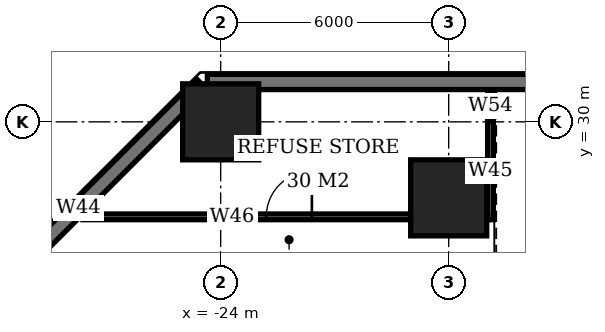
"""IFC4 building model, lengths in metres.
Left out: names, types, materials, properties, quantities, classifications, styles, units other than length and angle.
Written with IfcOpenShell. Run it as: python <this file> out.ifc"""

import sys

from ifc_helpers import new_model, si_unit, direction, frame, frame_2d, origin, origin_2d, place, context, subcontext, project, spatial, rectangle, extrude, element, fill, save


model = new_model("IFC4")
c1 = context("Model", 3, precision=1e-05, world=origin(), true_north=direction((0.0, 1.0)))
c2 = subcontext(c1, "Body", "Model", "MODEL_VIEW")
j1 = project(units=[si_unit("LENGTHUNIT", "METRE"), si_unit("PLANEANGLEUNIT", "RADIAN")], contexts=[c1])
p1 = place(None, origin())
s1 = spatial("IfcSite", under=j1, at=p1, CompositionType="ELEMENT")
p2 = place(p1, origin())
s2 = spatial("IfcBuilding", under=s1, at=p2, CompositionType="ELEMENT")
p3 = place(p2, frame((0.0, 0.0, -4.5)))
s3 = spatial("IfcBuildingStorey", under=s2, at=p3, CompositionType="ELEMENT", Elevation=-4.5)
p4 = place(p3, frame((-24.0, 30.0, 0.0), z_axis=(0.0, 0.0, 1.0), x_axis=(1.0, 0.0, 0.0)))
e1 = element("IfcColumn", 1, at=p4, inside=s3, PredefinedType="COLUMN", context=c2, shape_type="SweptSolid", body=[
    extrude(rectangle(XDim=2.0, YDim=2.0, at=origin_2d()), origin(), (0.0, 0.0, 1.0), 4.5),
])
p5 = place(p3, frame((-18.0, 28.0, 0.0), z_axis=(0.0, 0.0, 1.0), x_axis=(1.0, 0.0, 0.0)))
e2 = element("IfcColumn", 2, at=p5, inside=s3, PredefinedType="COLUMN", context=c2, shape_type="SweptSolid", body=[
    extrude(rectangle(XDim=2.0, YDim=2.0, at=origin_2d()), origin(), (0.0, 0.0, 1.0), 4.05),
])
p6 = place(p3, frame((-30.99, 24.495, 0.0), z_axis=(0.0, 0.0, 1.0), x_axis=(0.707106781187, 0.707106781187, 0.0)))
e3 = element("IfcWall", 3, at=p6, inside=s3, PredefinedType="USERDEFINED", context=c2, shape_type="SweptSolid", body=[
    extrude(rectangle(XDim=9.186, YDim=0.4, at=frame_2d((4.593, 0.0))), origin(), (0.0, 0.0, 1.0), 4.5),
])
p7 = place(p3, frame((-24.35, 31.05, 0.0), z_axis=(0.0, 0.0, 1.0), x_axis=(1.0, 0.0, 0.0)))
e4 = element("IfcWall", 4, at=p7, inside=s3, PredefinedType="USERDEFINED", context=c2, shape_type="SweptSolid", body=[
    extrude(rectangle(XDim=54.7, YDim=0.4, at=frame_2d((27.35, 0.0))), origin(), (0.0, 0.0, 1.0), 4.5),
])
p8 = place(p3, frame((-27.625, 27.5, 0.0), z_axis=(0.0, 0.0, 1.0), x_axis=(1.0, 0.0, 0.0)))
e5 = element("IfcWall", 5, at=p8, inside=s3, PredefinedType="PARTITIONING", context=c2, shape_type="SweptSolid", body=[
    extrude(rectangle(XDim=10.65, YDim=0.15, at=frame_2d((5.325, 0.0))), origin(), (0.0, 0.0, 1.0), 4.05),
])
p9 = place(p8, frame((4.825, 0.0, 0.0)))
e6 = element("IfcOpeningElement", 6, at=p9, cuts=e5, PredefinedType="OPENING", context=c2, shape_type="SweptSolid", body=[
    extrude(rectangle(XDim=1.2, YDim=2.4, at=frame_2d((0.6, 1.2))), frame((0.0, 0.085, 0.0), z_axis=(0.0, -1.0, 0.0), x_axis=(1.0, 0.0, 0.0)), (0.0, 0.0, 1.0), 0.17),
])
p10 = place(p3, frame((-16.9, 27.425, 0.0), z_axis=(0.0, 0.0, 1.0), x_axis=(0.0, 1.0, 0.0)))
e7 = element("IfcWall", 7, at=p10, inside=s3, PredefinedType="PARTITIONING", context=c2, shape_type="SweptSolid", body=[
    extrude(rectangle(XDim=2.585, YDim=0.15, at=frame_2d((1.292, 0.0))), origin(), (0.0, 0.0, 1.0), 2.55),
])
p11 = place(p3, frame((-16.9, 30.01, 0.0), z_axis=(0.0, 0.0, 1.0), x_axis=(0.0, 1.0, 0.0)))
e8 = element("IfcWall", 8, at=p11, inside=s3, PredefinedType="PARTITIONING", context=c2, shape_type="SweptSolid", body=[
    extrude(rectangle(XDim=0.84, YDim=0.15, at=frame_2d((0.42, 0.0))), origin(), (0.0, 0.0, 1.0), 4.05),
])
p12 = place(p9, origin())
e9 = element("IfcDoor", 9, at=p12, inside=s3, OperationType="SINGLE_SWING_RIGHT", PredefinedType="DOOR", context=c2, shape_type="SweptSolid", body=[
    extrude(rectangle(XDim=1.2, YDim=2.4, at=frame_2d((0.6, 1.2))), frame((0.0, 0.025, 0.0), z_axis=(0.0, -1.0, 0.0), x_axis=(1.0, 0.0, 0.0)), (0.0, 0.0, 1.0), 0.05),
])
fill(e6, e9)
save(model, sys.argv[1])
